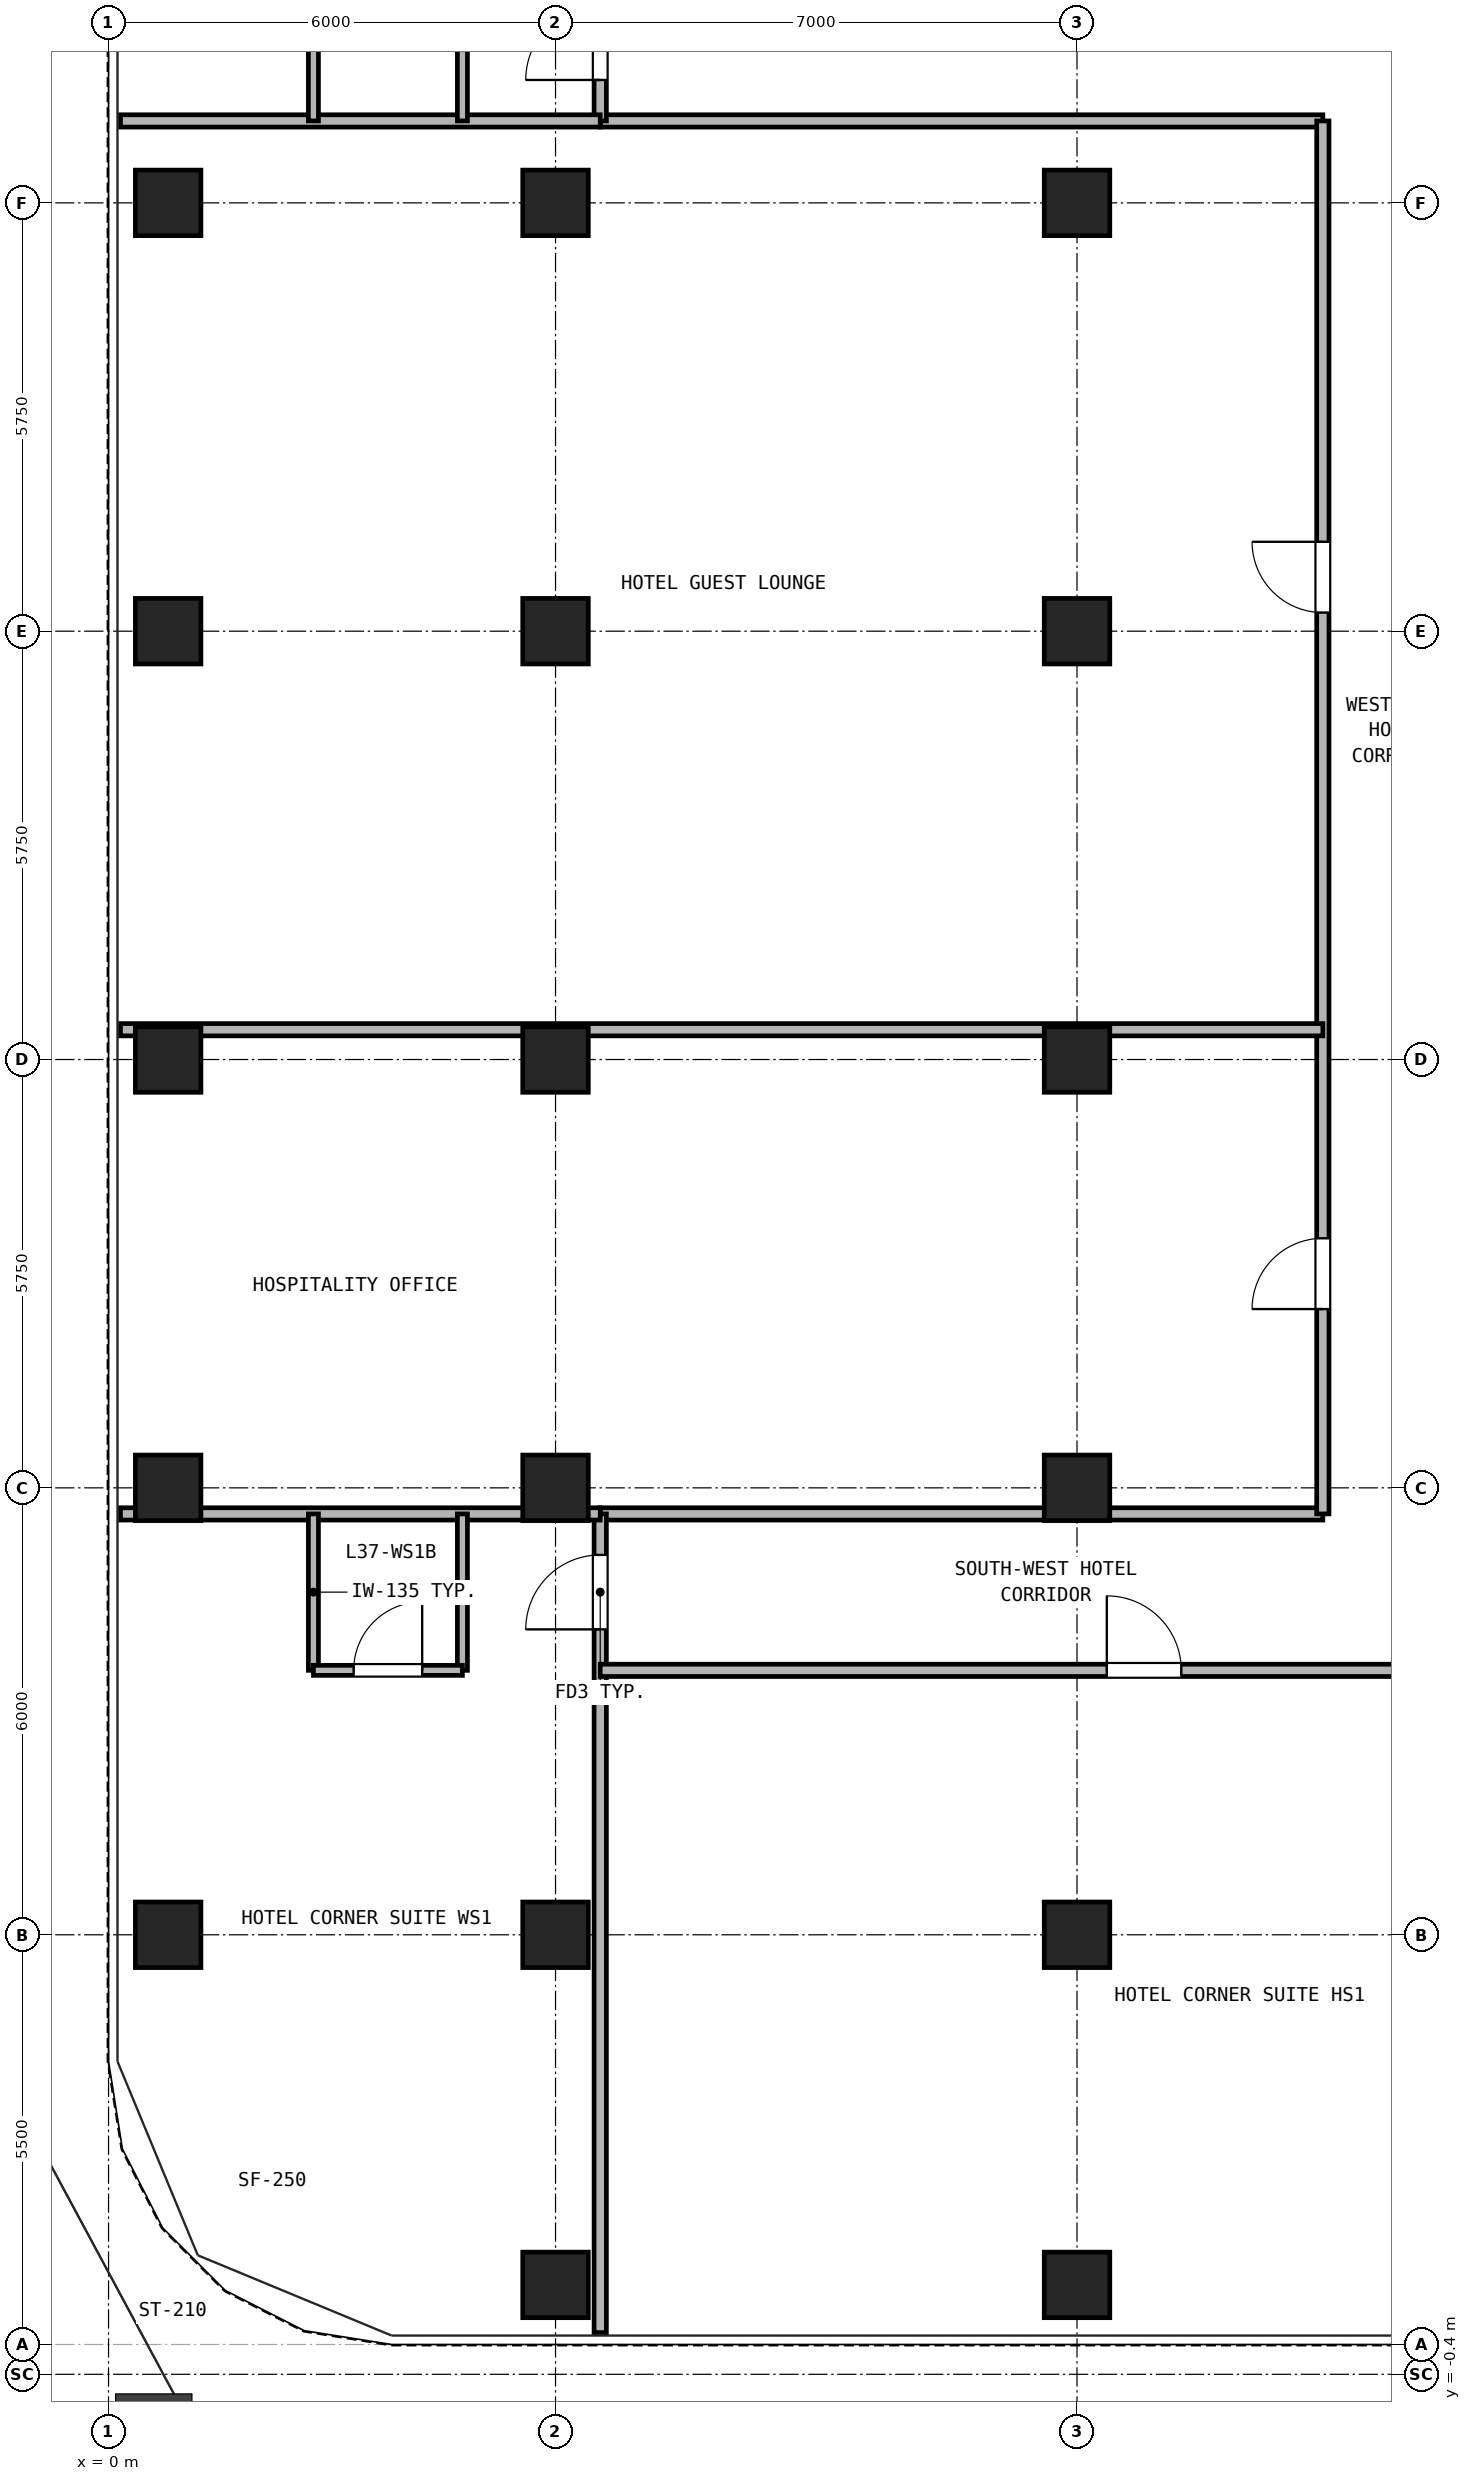
"""IFC4 building model, lengths in metres.
Left out: names, types, materials, properties, quantities, classifications, styles, units other than length and angle.
Written with IfcOpenShell. Run it as: python <this file> out.ifc"""

import sys

from ifc_helpers import new_model, si_unit, direction, frame, frame_2d, origin, origin_2d, place, context, subcontext, project, spatial, rectangle, hollow_rectangle, extrude, source, transform, mapped, element, fill, save


model = new_model("IFC4")
c1 = context("Model", 3, precision=1e-05, world=origin(), true_north=direction((0.0, 1.0)))
c2 = subcontext(c1, "Body", "Model", "MODEL_VIEW")
j1 = project(units=[si_unit("LENGTHUNIT", "METRE"), si_unit("PLANEANGLEUNIT", "RADIAN")], contexts=[c1])
p1 = place(None, origin())
s1 = spatial("IfcSite", under=j1, at=p1, CompositionType="ELEMENT")
p2 = place(p1, origin())
s2 = spatial("IfcBuilding", under=s1, at=p2, CompositionType="ELEMENT")
p3 = place(p2, frame((0.0, 0.0, 134.3)))
s3 = spatial("IfcBuildingStorey", under=s2, at=p3, CompositionType="ELEMENT", Elevation=134.3)
m1 = source(origin(), c2, "Body", "SweptSolid", [
    extrude(hollow_rectangle(XDim=0.88, YDim=0.88, WallThickness=0.05, at=origin_2d()), origin(), (0.0, 0.0, 1.0), 2.95),
])
for number, where, z_axis, x_axis in (
    (1, (6.0, 0.8, 0.0), (0.0, 0.0, 1.0), (1.0, 0.0, 0.0)),
    (2, (13.0, 0.8, 0.0), (0.0, 0.0, 1.0), (1.0, 0.0, 0.0)),
    (3, (0.8, 5.5, 0.0), (0.0, 0.0, 1.0), (1.0, 0.0, 0.0)),
    (4, (0.8, 11.5, 0.0), (0.0, 0.0, 1.0), (1.0, 0.0, 0.0)),
    (5, (0.8, 17.25, 0.0), (0.0, 0.0, 1.0), (1.0, 0.0, 0.0)),
    (6, (0.8, 23.0, 0.0), (0.0, 0.0, 1.0), (1.0, 0.0, 0.0)),
    (7, (0.8, 28.75, 0.0), (0.0, 0.0, 1.0), (1.0, 0.0, 0.0)),
    (8, (6.0, 5.5, 0.0), (0.0, 0.0, 1.0), (1.0, 0.0, 0.0)),
    (9, (6.0, 11.5, 0.0), (0.0, 0.0, 1.0), (1.0, 0.0, 0.0)),
    (10, (6.0, 17.25, 0.0), (0.0, 0.0, 1.0), (1.0, 0.0, 0.0)),
    (11, (6.0, 23.0, 0.0), (0.0, 0.0, 1.0), (1.0, 0.0, 0.0)),
    (12, (6.0, 28.75, 0.0), (0.0, 0.0, 1.0), (1.0, 0.0, 0.0)),
    (13, (13.0, 5.5, 0.0), (0.0, 0.0, 1.0), (1.0, 0.0, 0.0)),
    (14, (13.0, 11.5, 0.0), (0.0, 0.0, 1.0), (1.0, 0.0, 0.0)),
    (15, (13.0, 17.25, 0.0), (0.0, 0.0, 1.0), (1.0, 0.0, 0.0)),
    (16, (13.0, 23.0, 0.0), (0.0, 0.0, 1.0), (1.0, 0.0, 0.0)),
    (17, (13.0, 28.75, 0.0), (0.0, 0.0, 1.0), (1.0, 0.0, 0.0)),
):
    element("IfcColumn", number, at=place(p3, frame(where, z_axis=z_axis, x_axis=x_axis)), inside=s3, PredefinedType="COLUMN", context=c2, shape_type="MappedRepresentation", body=[
        mapped(m1, transform((0.0, 0.0, 0.0), x_axis=(1.0, 0.0, 0.0), y_axis=(0.0, 1.0, 0.0), z_axis=(0.0, 0.0, 1.0), scale=1.0)),
    ])
for number, where, z_axis, x_axis in (
    (18, (6.6, 11.15, 0.0), (0.0, 0.0, 1.0), (1.0, 0.0, 0.0)),
    (19, (6.6, 29.85, 0.0), (0.0, 0.0, 1.0), (1.0, 0.0, 0.0)),
):
    element("IfcWall", number, at=place(p3, frame(where, z_axis=z_axis, x_axis=x_axis)), inside=s3, PredefinedType="PARTITIONING", context=c2, shape_type="SweptSolid", body=[
        extrude(rectangle(XDim=9.7, YDim=0.165, at=frame_2d((4.85, 0.0))), origin(), (0.0, 0.0, 1.0), 2.95),
    ])
p4 = place(p3, frame((16.3, 11.15, 0.0), z_axis=(0.0, 0.0, 1.0), x_axis=(0.0, 1.0, 0.0)))
e20 = element("IfcWall", 20, at=p4, inside=s3, PredefinedType="PARTITIONING", context=c2, shape_type="SweptSolid", body=[
    extrude(rectangle(XDim=18.7, YDim=0.165, at=frame_2d((9.35, 0.0))), origin(), (0.0, 0.0, 1.0), 2.95),
])
p5 = place(p4, frame((2.75, 0.0, 0.0)))
e21 = element("IfcOpeningElement", 21, at=p5, cuts=e20, PredefinedType="OPENING", context=c2, shape_type="SweptSolid", body=[
    extrude(rectangle(XDim=0.95, YDim=2.15, at=frame_2d((0.475, 1.075))), frame((0.0, 0.093, 0.0), z_axis=(0.0, -1.0, 0.0), x_axis=(1.0, 0.0, 0.0)), (0.0, 0.0, 1.0), 0.185),
])
p6 = place(p4, frame((12.1, 0.0, 0.0)))
e22 = element("IfcOpeningElement", 22, at=p6, cuts=e20, PredefinedType="OPENING", context=c2, shape_type="SweptSolid", body=[
    extrude(rectangle(XDim=0.95, YDim=2.15, at=frame_2d((0.475, 1.075))), frame((0.0, 0.093, 0.0), z_axis=(0.0, -1.0, 0.0), x_axis=(1.0, 0.0, 0.0)), (0.0, 0.0, 1.0), 0.185),
])
p7 = place(p3, frame((6.6, 0.16, 0.0), z_axis=(0.0, 0.0, 1.0), x_axis=(0.0, 1.0, 0.0)))
e23 = element("IfcWall", 23, at=p7, inside=s3, PredefinedType="PARTITIONING", context=c2, shape_type="SweptSolid", body=[
    extrude(rectangle(XDim=10.99, YDim=0.165, at=frame_2d((5.495, 0.0))), origin(), (0.0, 0.0, 1.0), 2.95),
])
p8 = place(p7, frame((9.44, 0.0, 0.0)))
e24 = element("IfcOpeningElement", 24, at=p8, cuts=e23, PredefinedType="OPENING", context=c2, shape_type="SweptSolid", body=[
    extrude(rectangle(XDim=1.0, YDim=2.15, at=frame_2d((0.5, 1.075))), frame((0.0, 0.093, 0.0), z_axis=(0.0, -1.0, 0.0), x_axis=(1.0, 0.0, 0.0)), (0.0, 0.0, 1.0), 0.185),
])
p9 = place(p3, frame((6.6, 29.85, 0.0), z_axis=(0.0, 0.0, 1.0), x_axis=(0.0, 1.0, 0.0)))
e25 = element("IfcWall", 25, at=p9, inside=s3, PredefinedType="PARTITIONING", context=c2, shape_type="SweptSolid", body=[
    extrude(rectangle(XDim=5.29, YDim=0.165, at=frame_2d((2.645, 0.0))), origin(), (0.0, 0.0, 1.0), 2.95),
])
p10 = place(p9, frame((0.55, 0.0, 0.0)))
e26 = element("IfcOpeningElement", 26, at=p10, cuts=e25, PredefinedType="OPENING", context=c2, shape_type="SweptSolid", body=[
    extrude(rectangle(XDim=1.0, YDim=2.15, at=frame_2d((0.5, 1.075))), frame((0.0, 0.093, 0.0), z_axis=(0.0, -1.0, 0.0), x_axis=(1.0, 0.0, 0.0)), (0.0, 0.0, 1.0), 0.185),
])
for number, where, z_axis, x_axis in (
    (27, (0.16, 11.15, 0.0), (0.0, 0.0, 1.0), (1.0, 0.0, 0.0)),
    (28, (0.16, 29.85, 0.0), (0.0, 0.0, 1.0), (1.0, 0.0, 0.0)),
):
    element("IfcWall", number, at=place(p3, frame(where, z_axis=z_axis, x_axis=x_axis)), inside=s3, PredefinedType="PARTITIONING", context=c2, shape_type="SweptSolid", body=[
        extrude(rectangle(XDim=6.44, YDim=0.165, at=frame_2d((3.22, 0.0))), origin(), (0.0, 0.0, 1.0), 2.95),
    ])
for number, where, z_axis, x_axis in (
    (29, (2.75, 9.05, 0.0), (0.0, 0.0, 1.0), (0.0, 1.0, 0.0)),
    (30, (4.75, 9.05, 0.0), (0.0, 0.0, 1.0), (0.0, 1.0, 0.0)),
):
    element("IfcWall", number, at=place(p3, frame(where, z_axis=z_axis, x_axis=x_axis)), inside=s3, PredefinedType="PARTITIONING", context=c2, shape_type="SweptSolid", body=[
        extrude(rectangle(XDim=2.1, YDim=0.135, at=frame_2d((1.05, 0.0))), origin(), (0.0, 0.0, 1.0), 2.95),
    ])
p11 = place(p3, frame((2.75, 9.05, 0.0), z_axis=(0.0, 0.0, 1.0), x_axis=(1.0, 0.0, 0.0)))
e31 = element("IfcWall", 31, at=p11, inside=s3, PredefinedType="PARTITIONING", context=c2, shape_type="SweptSolid", body=[
    extrude(rectangle(XDim=2.0, YDim=0.135, at=frame_2d((1.0, 0.0))), origin(), (0.0, 0.0, 1.0), 2.95),
])
p12 = place(p11, frame((0.54, 0.0, 0.0)))
e32 = element("IfcOpeningElement", 32, at=p12, cuts=e31, PredefinedType="OPENING", context=c2, shape_type="SweptSolid", body=[
    extrude(rectangle(XDim=0.92, YDim=2.1, at=frame_2d((0.46, 1.05))), frame((0.0, 0.077, 0.0), z_axis=(0.0, -1.0, 0.0), x_axis=(1.0, 0.0, 0.0)), (0.0, 0.0, 1.0), 0.155),
])
for number, where, z_axis, x_axis in (
    (33, (2.75, 29.85, 0.0), (0.0, 0.0, 1.0), (0.0, 1.0, 0.0)),
    (34, (4.75, 29.85, 0.0), (0.0, 0.0, 1.0), (0.0, 1.0, 0.0)),
):
    element("IfcWall", number, at=place(p3, frame(where, z_axis=z_axis, x_axis=x_axis)), inside=s3, PredefinedType="PARTITIONING", context=c2, shape_type="SweptSolid", body=[
        extrude(rectangle(XDim=2.1, YDim=0.135, at=frame_2d((1.05, 0.0))), origin(), (0.0, 0.0, 1.0), 2.95),
    ])
p13 = place(p3, frame((6.6, 9.05, 0.0), z_axis=(0.0, 0.0, 1.0), x_axis=(1.0, 0.0, 0.0)))
e35 = element("IfcWall", 35, at=p13, inside=s3, PredefinedType="PARTITIONING", context=c2, shape_type="SweptSolid", body=[
    extrude(rectangle(XDim=14.6, YDim=0.165, at=frame_2d((7.3, 0.0))), origin(), (0.0, 0.0, 1.0), 2.95),
])
p14 = place(p13, frame((6.8, 0.0, 0.0)))
e36 = element("IfcOpeningElement", 36, at=p14, cuts=e35, PredefinedType="OPENING", context=c2, shape_type="SweptSolid", body=[
    extrude(rectangle(XDim=1.0, YDim=2.15, at=frame_2d((0.5, 1.075))), frame((0.0, 0.093, 0.0), z_axis=(0.0, -1.0, 0.0), x_axis=(1.0, 0.0, 0.0)), (0.0, 0.0, 1.0), 0.185),
])
p15 = place(p3, frame((0.16, 17.65, 0.0), z_axis=(0.0, 0.0, 1.0), x_axis=(1.0, 0.0, 0.0)))
e37 = element("IfcWall", 37, at=p15, inside=s3, PredefinedType="PARTITIONING", context=c2, shape_type="SweptSolid", body=[
    extrude(rectangle(XDim=16.14, YDim=0.165, at=frame_2d((8.07, 0.0))), origin(), (0.0, 0.0, 1.0), 2.95),
])
p16 = place(p12, origin())
e38 = element("IfcDoor", 38, at=p16, inside=s3, OperationType="SINGLE_SWING_RIGHT", PredefinedType="DOOR", context=c2, shape_type="SweptSolid", body=[
    extrude(rectangle(XDim=0.92, YDim=2.1, at=frame_2d((0.46, 1.05))), frame((0.0, 0.025, 0.0), z_axis=(0.0, -1.0, 0.0), x_axis=(1.0, 0.0, 0.0)), (0.0, 0.0, 1.0), 0.05),
])
fill(e32, e38)
p17 = place(p8, origin())
e39 = element("IfcDoor", 39, at=p17, inside=s3, OperationType="SINGLE_SWING_LEFT", PredefinedType="DOOR", context=c2, shape_type="SweptSolid", body=[
    extrude(rectangle(XDim=1.0, YDim=2.15, at=frame_2d((0.5, 1.075))), frame((0.0, 0.025, 0.0), z_axis=(0.0, -1.0, 0.0), x_axis=(1.0, 0.0, 0.0)), (0.0, 0.0, 1.0), 0.05),
])
fill(e24, e39)
p18 = place(p10, origin())
e40 = element("IfcDoor", 40, at=p18, inside=s3, OperationType="SINGLE_SWING_LEFT", PredefinedType="DOOR", context=c2, shape_type="SweptSolid", body=[
    extrude(rectangle(XDim=1.0, YDim=2.15, at=frame_2d((0.5, 1.075))), frame((0.0, 0.025, 0.0), z_axis=(0.0, -1.0, 0.0), x_axis=(1.0, 0.0, 0.0)), (0.0, 0.0, 1.0), 0.05),
])
fill(e26, e40)
p19 = place(p14, frame((1.0, 0.0, 0.0), z_axis=(0.0, 0.0, 1.0), x_axis=(-1.0, 0.0, 0.0)))
e41 = element("IfcDoor", 41, at=p19, inside=s3, OperationType="SINGLE_SWING_LEFT", PredefinedType="DOOR", context=c2, shape_type="SweptSolid", body=[
    extrude(rectangle(XDim=1.0, YDim=2.15, at=frame_2d((0.5, 1.075))), frame((0.0, 0.025, 0.0), z_axis=(0.0, -1.0, 0.0), x_axis=(1.0, 0.0, 0.0)), (0.0, 0.0, 1.0), 0.05),
])
fill(e36, e41)
p20 = place(p5, frame((0.95, 0.0, 0.0), z_axis=(0.0, 0.0, 1.0), x_axis=(-1.0, 0.0, 0.0)))
e42 = element("IfcDoor", 42, at=p20, inside=s3, OperationType="SINGLE_SWING_LEFT", PredefinedType="DOOR", context=c2, shape_type="SweptSolid", body=[
    extrude(rectangle(XDim=0.95, YDim=2.15, at=frame_2d((0.475, 1.075))), frame((0.0, 0.025, 0.0), z_axis=(0.0, -1.0, 0.0), x_axis=(1.0, 0.0, 0.0)), (0.0, 0.0, 1.0), 0.05),
])
fill(e21, e42)
p21 = place(p6, frame((0.95, 0.0, 0.0), z_axis=(0.0, 0.0, 1.0), x_axis=(-1.0, 0.0, 0.0)))
e43 = element("IfcDoor", 43, at=p21, inside=s3, OperationType="SINGLE_SWING_RIGHT", PredefinedType="DOOR", context=c2, shape_type="SweptSolid", body=[
    extrude(rectangle(XDim=0.95, YDim=2.15, at=frame_2d((0.475, 1.075))), frame((0.0, 0.025, 0.0), z_axis=(0.0, -1.0, 0.0), x_axis=(1.0, 0.0, 0.0)), (0.0, 0.0, 1.0), 0.05),
])
fill(e22, e43)
save(model, sys.argv[1])
